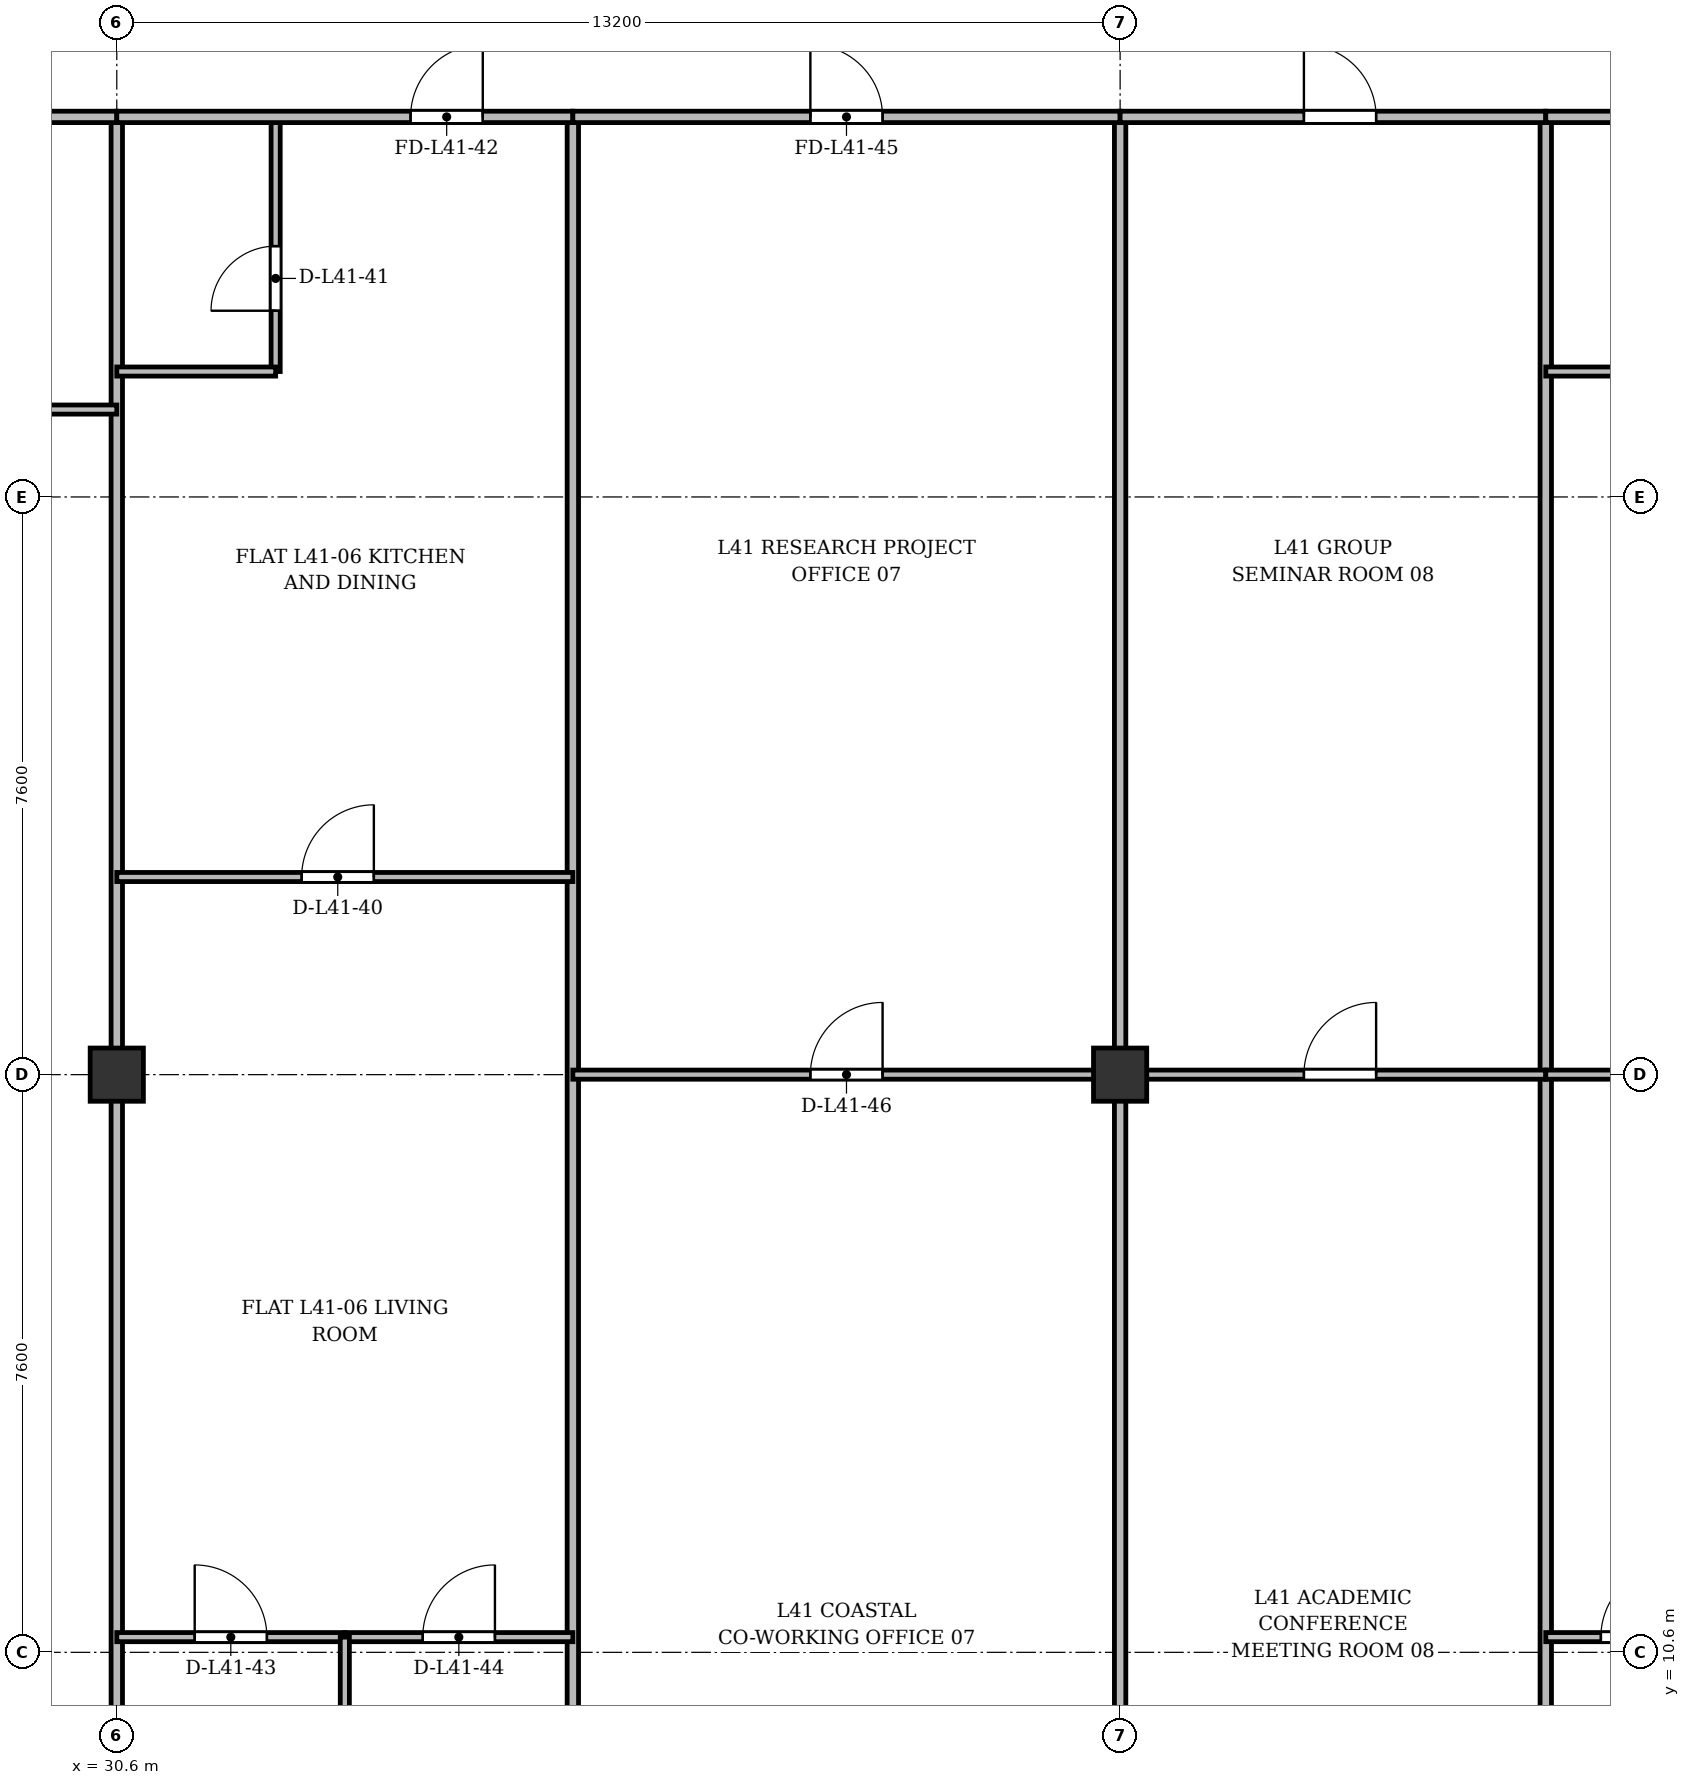
"""IFC4 building model, lengths in metres.
Left out: names, types, materials, properties, quantities, classifications, styles, units other than length and angle.
Written with IfcOpenShell. Run it as: python <this file> out.ifc"""

import sys

from ifc_helpers import new_model, si_unit, direction, frame, frame_2d, origin, origin_2d, place, context, subcontext, project, spatial, rectangle, extrude, source, transform, mapped, element, fill, save


model = new_model("IFC4")
c1 = context("Model", 3, precision=1e-05, world=origin(), true_north=direction((0.0, 1.0)))
c2 = subcontext(c1, "Body", "Model", "MODEL_VIEW")
j1 = project(units=[si_unit("LENGTHUNIT", "METRE"), si_unit("PLANEANGLEUNIT", "RADIAN")], contexts=[c1])
p1 = place(None, origin())
s1 = spatial("IfcSite", under=j1, at=p1, CompositionType="ELEMENT")
p2 = place(p1, origin())
s2 = spatial("IfcBuilding", under=s1, at=p2, CompositionType="ELEMENT")
p3 = place(p2, frame((0.0, 0.0, 157.3)))
s3 = spatial("IfcBuildingStorey", under=s2, at=p3, CompositionType="ELEMENT", Elevation=157.3)
m1 = source(origin(), c2, "Body", "SweptSolid", [
    extrude(rectangle(XDim=0.7, YDim=0.7, at=origin_2d()), origin(), (0.0, 0.0, 1.0), 3.6),
])
for number, where, z_axis, x_axis in (
    (1, (30.6, 18.2, 0.0), (0.0, 0.0, 1.0), (1.0, 0.0, 0.0)),
    (2, (43.8, 18.2, 0.0), (0.0, 0.0, 1.0), (1.0, 0.0, 0.0)),
):
    element("IfcColumn", number, at=place(p3, frame(where, z_axis=z_axis, x_axis=x_axis)), inside=s3, PredefinedType="COLUMN", context=c2, shape_type="MappedRepresentation", body=[
        mapped(m1, transform((0.0, 0.0, 0.0), x_axis=(1.0, 0.0, 0.0), y_axis=(0.0, 1.0, 0.0), z_axis=(0.0, 0.0, 1.0), scale=1.0)),
    ])
p4 = place(p3, frame((30.6, 3.525, 0.0), z_axis=(0.0, 0.0, 1.0), x_axis=(0.0, 1.0, 0.0)))
e3 = element("IfcWall", 3, at=p4, inside=s3, PredefinedType="PARTITIONING", context=c2, shape_type="SweptSolid", body=[
    extrude(rectangle(XDim=27.275, YDim=0.15, at=frame_2d((13.638, 0.0))), origin(), (0.0, 0.0, 1.0), 2.85),
])
p5 = place(p3, frame((36.6, 3.525, 0.0), z_axis=(0.0, 0.0, 1.0), x_axis=(0.0, 1.0, 0.0)))
e4 = element("IfcWall", 4, at=p5, inside=s3, PredefinedType="PARTITIONING", context=c2, shape_type="SweptSolid", body=[
    extrude(rectangle(XDim=27.275, YDim=0.15, at=frame_2d((13.638, 0.0))), origin(), (0.0, 0.0, 1.0), 2.75),
])
p6 = place(p3, frame((43.8, 3.525, 0.0), z_axis=(0.0, 0.0, 1.0), x_axis=(0.0, 1.0, 0.0)))
e5 = element("IfcWall", 5, at=p6, inside=s3, PredefinedType="PARTITIONING", context=c2, shape_type="SweptSolid", body=[
    extrude(rectangle(XDim=27.275, YDim=0.15, at=frame_2d((13.638, 0.0))), origin(), (0.0, 0.0, 1.0), 2.85),
])
p7 = place(p3, frame((49.4, 3.525, 0.0), z_axis=(0.0, 0.0, 1.0), x_axis=(0.0, 1.0, 0.0)))
e6 = element("IfcWall", 6, at=p7, inside=s3, PredefinedType="PARTITIONING", context=c2, shape_type="SweptSolid", body=[
    extrude(rectangle(XDim=27.275, YDim=0.15, at=frame_2d((13.638, 0.0))), origin(), (0.0, 0.0, 1.0), 2.75),
])
p8 = place(p3, frame((26.2, 30.8, 0.0), z_axis=(0.0, 0.0, 1.0), x_axis=(1.0, 0.0, 0.0)))
e7 = element("IfcWall", 7, at=p8, inside=s3, PredefinedType="PARTITIONING", context=c2, shape_type="SweptSolid", body=[
    extrude(rectangle(XDim=4.4, YDim=0.15, at=frame_2d((2.2, 0.0))), origin(), (0.0, 0.0, 1.0), 2.85),
])
p9 = place(p8, frame((1.725, 0.0, 0.0)))
e8 = element("IfcOpeningElement", 8, at=p9, cuts=e7, PredefinedType="OPENING", context=c2, shape_type="SweptSolid", body=[
    extrude(rectangle(XDim=0.95, YDim=2.15, at=frame_2d((0.475, 1.075))), frame((0.0, 0.085, 0.0), z_axis=(0.0, -1.0, 0.0), x_axis=(1.0, 0.0, 0.0)), (0.0, 0.0, 1.0), 0.17),
])
p10 = place(p3, frame((26.2, 26.95, 0.0), z_axis=(0.0, 0.0, 1.0), x_axis=(1.0, 0.0, 0.0)))
e9 = element("IfcWall", 9, at=p10, inside=s3, PredefinedType="PARTITIONING", context=c2, shape_type="SweptSolid", body=[
    extrude(rectangle(XDim=4.4, YDim=0.12, at=frame_2d((2.2, 0.0))), origin(), (0.0, 0.0, 1.0), 2.85),
])
p11 = place(p10, frame((1.725, 0.0, 0.0)))
e10 = element("IfcOpeningElement", 10, at=p11, cuts=e9, PredefinedType="OPENING", context=c2, shape_type="SweptSolid", body=[
    extrude(rectangle(XDim=0.95, YDim=2.15, at=frame_2d((0.475, 1.075))), frame((0.0, 0.07, 0.0), z_axis=(0.0, -1.0, 0.0), x_axis=(1.0, 0.0, 0.0)), (0.0, 0.0, 1.0), 0.14),
])
p12 = place(p3, frame((30.6, 20.8, 0.0), z_axis=(0.0, 0.0, 1.0), x_axis=(1.0, 0.0, 0.0)))
e11 = element("IfcWall", 11, at=p12, inside=s3, PredefinedType="PARTITIONING", context=c2, shape_type="SweptSolid", body=[
    extrude(rectangle(XDim=6.0, YDim=0.12, at=frame_2d((3.0, 0.0))), origin(), (0.0, 0.0, 1.0), 2.85),
])
p13 = place(p12, frame((2.432, 0.0, 0.0)))
e12 = element("IfcOpeningElement", 12, at=p13, cuts=e11, PredefinedType="OPENING", context=c2, shape_type="SweptSolid", body=[
    extrude(rectangle(XDim=0.95, YDim=2.15, at=frame_2d((0.475, 1.075))), frame((0.0, 0.07, 0.0), z_axis=(0.0, -1.0, 0.0), x_axis=(1.0, 0.0, 0.0)), (0.0, 0.0, 1.0), 0.14),
])
p14 = place(p3, frame((32.69, 27.45, 0.0), z_axis=(0.0, 0.0, 1.0), x_axis=(0.0, 1.0, 0.0)))
e13 = element("IfcWall", 13, at=p14, inside=s3, PredefinedType="PARTITIONING", context=c2, shape_type="SweptSolid", body=[
    extrude(rectangle(XDim=3.35, YDim=0.12, at=frame_2d((1.675, 0.0))), origin(), (0.0, 0.0, 1.0), 3.35),
])
p15 = place(p14, frame((0.8, 0.0, 0.0)))
e14 = element("IfcOpeningElement", 14, at=p15, cuts=e13, PredefinedType="OPENING", context=c2, shape_type="SweptSolid", body=[
    extrude(rectangle(XDim=0.85, YDim=2.1, at=frame_2d((0.425, 1.05))), frame((0.0, 0.07, 0.0), z_axis=(0.0, -1.0, 0.0), x_axis=(1.0, 0.0, 0.0)), (0.0, 0.0, 1.0), 0.14),
])
p16 = place(p3, frame((30.6, 27.45, 0.0), z_axis=(0.0, 0.0, 1.0), x_axis=(1.0, 0.0, 0.0)))
e15 = element("IfcWall", 15, at=p16, inside=s3, PredefinedType="PARTITIONING", context=c2, shape_type="SweptSolid", body=[
    extrude(rectangle(XDim=2.09, YDim=0.12, at=frame_2d((1.045, 0.0))), origin(), (0.0, 0.0, 1.0), 2.85),
])
p17 = place(p3, frame((30.6, 30.8, 0.0), z_axis=(0.0, 0.0, 1.0), x_axis=(1.0, 0.0, 0.0)))
e16 = element("IfcWall", 16, at=p17, inside=s3, PredefinedType="PARTITIONING", context=c2, shape_type="SweptSolid", body=[
    extrude(rectangle(XDim=6.0, YDim=0.15, at=frame_2d((3.0, 0.0))), origin(), (0.0, 0.0, 1.0), 2.85),
])
p18 = place(p17, frame((3.865, 0.0, 0.0)))
e17 = element("IfcOpeningElement", 17, at=p18, cuts=e16, PredefinedType="OPENING", context=c2, shape_type="SweptSolid", body=[
    extrude(rectangle(XDim=0.95, YDim=2.15, at=frame_2d((0.475, 1.075))), frame((0.0, 0.085, 0.0), z_axis=(0.0, -1.0, 0.0), x_axis=(1.0, 0.0, 0.0)), (0.0, 0.0, 1.0), 0.17),
])
p19 = place(p3, frame((30.6, 10.8, 0.0), z_axis=(0.0, 0.0, 1.0), x_axis=(1.0, 0.0, 0.0)))
e18 = element("IfcWall", 18, at=p19, inside=s3, PredefinedType="PARTITIONING", context=c2, shape_type="SweptSolid", body=[
    extrude(rectangle(XDim=3.0, YDim=0.12, at=frame_2d((1.5, 0.0))), origin(), (0.0, 0.0, 1.0), 2.85),
])
p20 = place(p19, frame((1.025, 0.0, 0.0)))
e19 = element("IfcOpeningElement", 19, at=p20, cuts=e18, PredefinedType="OPENING", context=c2, shape_type="SweptSolid", body=[
    extrude(rectangle(XDim=0.95, YDim=2.15, at=frame_2d((0.475, 1.075))), frame((0.0, 0.07, 0.0), z_axis=(0.0, -1.0, 0.0), x_axis=(1.0, 0.0, 0.0)), (0.0, 0.0, 1.0), 0.14),
])
p21 = place(p3, frame((33.6, 10.8, 0.0), z_axis=(0.0, 0.0, 1.0), x_axis=(1.0, 0.0, 0.0)))
e20 = element("IfcWall", 20, at=p21, inside=s3, PredefinedType="PARTITIONING", context=c2, shape_type="SweptSolid", body=[
    extrude(rectangle(XDim=3.0, YDim=0.12, at=frame_2d((1.5, 0.0))), origin(), (0.0, 0.0, 1.0), 3.35),
])
p22 = place(p21, frame((1.025, 0.0, 0.0)))
e21 = element("IfcOpeningElement", 21, at=p22, cuts=e20, PredefinedType="OPENING", context=c2, shape_type="SweptSolid", body=[
    extrude(rectangle(XDim=0.95, YDim=2.15, at=frame_2d((0.475, 1.075))), frame((0.0, 0.07, 0.0), z_axis=(0.0, -1.0, 0.0), x_axis=(1.0, 0.0, 0.0)), (0.0, 0.0, 1.0), 0.14),
])
p23 = place(p3, frame((33.6, 3.525, 0.0), z_axis=(0.0, 0.0, 1.0), x_axis=(0.0, 1.0, 0.0)))
e22 = element("IfcWall", 22, at=p23, inside=s3, PredefinedType="PARTITIONING", context=c2, shape_type="SweptSolid", body=[
    extrude(rectangle(XDim=7.275, YDim=0.12, at=frame_2d((3.638, 0.0))), origin(), (0.0, 0.0, 1.0), 2.75),
])
p24 = place(p3, frame((36.6, 30.8, 0.0), z_axis=(0.0, 0.0, 1.0), x_axis=(1.0, 0.0, 0.0)))
e23 = element("IfcWall", 23, at=p24, inside=s3, PredefinedType="PARTITIONING", context=c2, shape_type="SweptSolid", body=[
    extrude(rectangle(XDim=7.2, YDim=0.15, at=frame_2d((3.6, 0.0))), origin(), (0.0, 0.0, 1.0), 2.85),
])
p25 = place(p24, frame((3.125, 0.0, 0.0)))
e24 = element("IfcOpeningElement", 24, at=p25, cuts=e23, PredefinedType="OPENING", context=c2, shape_type="SweptSolid", body=[
    extrude(rectangle(XDim=0.95, YDim=2.15, at=frame_2d((0.475, 1.075))), frame((0.0, 0.085, 0.0), z_axis=(0.0, -1.0, 0.0), x_axis=(1.0, 0.0, 0.0)), (0.0, 0.0, 1.0), 0.17),
])
p26 = place(p3, frame((36.6, 18.2, 0.0), z_axis=(0.0, 0.0, 1.0), x_axis=(1.0, 0.0, 0.0)))
e25 = element("IfcWall", 25, at=p26, inside=s3, PredefinedType="PARTITIONING", context=c2, shape_type="SweptSolid", body=[
    extrude(rectangle(XDim=7.2, YDim=0.12, at=frame_2d((3.6, 0.0))), origin(), (0.0, 0.0, 1.0), 2.75),
])
p27 = place(p26, frame((3.125, 0.0, 0.0)))
e26 = element("IfcOpeningElement", 26, at=p27, cuts=e25, PredefinedType="OPENING", context=c2, shape_type="SweptSolid", body=[
    extrude(rectangle(XDim=0.95, YDim=2.15, at=frame_2d((0.475, 1.075))), frame((0.0, 0.07, 0.0), z_axis=(0.0, -1.0, 0.0), x_axis=(1.0, 0.0, 0.0)), (0.0, 0.0, 1.0), 0.14),
])
p28 = place(p3, frame((43.8, 30.8, 0.0), z_axis=(0.0, 0.0, 1.0), x_axis=(1.0, 0.0, 0.0)))
e27 = element("IfcWall", 27, at=p28, inside=s3, PredefinedType="PARTITIONING", context=c2, shape_type="SweptSolid", body=[
    extrude(rectangle(XDim=5.6, YDim=0.15, at=frame_2d((2.8, 0.0))), origin(), (0.0, 0.0, 1.0), 2.85),
])
p29 = place(p28, frame((2.418, 0.0, 0.0)))
e28 = element("IfcOpeningElement", 28, at=p29, cuts=e27, PredefinedType="OPENING", context=c2, shape_type="SweptSolid", body=[
    extrude(rectangle(XDim=0.95, YDim=2.15, at=frame_2d((0.475, 1.075))), frame((0.0, 0.085, 0.0), z_axis=(0.0, -1.0, 0.0), x_axis=(1.0, 0.0, 0.0)), (0.0, 0.0, 1.0), 0.17),
])
p30 = place(p3, frame((43.8, 18.2, 0.0), z_axis=(0.0, 0.0, 1.0), x_axis=(1.0, 0.0, 0.0)))
e29 = element("IfcWall", 29, at=p30, inside=s3, PredefinedType="PARTITIONING", context=c2, shape_type="SweptSolid", body=[
    extrude(rectangle(XDim=5.6, YDim=0.12, at=frame_2d((2.8, 0.0))), origin(), (0.0, 0.0, 1.0), 2.75),
])
p31 = place(p30, frame((2.418, 0.0, 0.0)))
e30 = element("IfcOpeningElement", 30, at=p31, cuts=e29, PredefinedType="OPENING", context=c2, shape_type="SweptSolid", body=[
    extrude(rectangle(XDim=0.95, YDim=2.15, at=frame_2d((0.475, 1.075))), frame((0.0, 0.07, 0.0), z_axis=(0.0, -1.0, 0.0), x_axis=(1.0, 0.0, 0.0)), (0.0, 0.0, 1.0), 0.14),
])
p32 = place(p3, frame((49.4, 18.2, 0.0), z_axis=(0.0, 0.0, 1.0), x_axis=(1.0, 0.0, 0.0)))
e31 = element("IfcWall", 31, at=p32, inside=s3, PredefinedType="PARTITIONING", context=c2, shape_type="SweptSolid", body=[
    extrude(rectangle(XDim=4.8, YDim=0.12, at=frame_2d((2.4, 0.0))), origin(), (0.0, 0.0, 1.0), 2.75),
])
p33 = place(p32, frame((2.561, 0.0, 0.0)))
e32 = element("IfcOpeningElement", 32, at=p33, cuts=e31, PredefinedType="OPENING", context=c2, shape_type="SweptSolid", body=[
    extrude(rectangle(XDim=0.95, YDim=2.15, at=frame_2d((0.475, 1.075))), frame((0.0, 0.07, 0.0), z_axis=(0.0, -1.0, 0.0), x_axis=(1.0, 0.0, 0.0)), (0.0, 0.0, 1.0), 0.14),
])
p34 = place(p3, frame((49.4, 27.45, 0.0), z_axis=(0.0, 0.0, 1.0), x_axis=(1.0, 0.0, 0.0)))
e33 = element("IfcWall", 33, at=p34, inside=s3, PredefinedType="PARTITIONING", context=c2, shape_type="SweptSolid", body=[
    extrude(rectangle(XDim=1.9, YDim=0.12, at=frame_2d((0.95, 0.0))), origin(), (0.0, 0.0, 1.0), 2.85),
])
p35 = place(p3, frame((49.4, 30.8, 0.0), z_axis=(0.0, 0.0, 1.0), x_axis=(1.0, 0.0, 0.0)))
e34 = element("IfcWall", 34, at=p35, inside=s3, PredefinedType="PARTITIONING", context=c2, shape_type="SweptSolid", body=[
    extrude(rectangle(XDim=4.8, YDim=0.15, at=frame_2d((2.4, 0.0))), origin(), (0.0, 0.0, 1.0), 2.85),
])
p36 = place(p35, frame((3.019, 0.0, 0.0)))
e35 = element("IfcOpeningElement", 35, at=p36, cuts=e34, PredefinedType="OPENING", context=c2, shape_type="SweptSolid", body=[
    extrude(rectangle(XDim=0.95, YDim=2.15, at=frame_2d((0.475, 1.075))), frame((0.0, 0.085, 0.0), z_axis=(0.0, -1.0, 0.0), x_axis=(1.0, 0.0, 0.0)), (0.0, 0.0, 1.0), 0.17),
])
p37 = place(p3, frame((49.4, 10.8, 0.0), z_axis=(0.0, 0.0, 1.0), x_axis=(1.0, 0.0, 0.0)))
e36 = element("IfcWall", 36, at=p37, inside=s3, PredefinedType="PARTITIONING", context=c2, shape_type="SweptSolid", body=[
    extrude(rectangle(XDim=2.4, YDim=0.12, at=frame_2d((1.2, 0.0))), origin(), (0.0, 0.0, 1.0), 2.85),
])
p38 = place(p37, frame((0.725, 0.0, 0.0)))
e37 = element("IfcOpeningElement", 37, at=p38, cuts=e36, PredefinedType="OPENING", context=c2, shape_type="SweptSolid", body=[
    extrude(rectangle(XDim=0.95, YDim=2.15, at=frame_2d((0.475, 1.075))), frame((0.0, 0.07, 0.0), z_axis=(0.0, -1.0, 0.0), x_axis=(1.0, 0.0, 0.0)), (0.0, 0.0, 1.0), 0.14),
])
m2 = source(origin(), c2, "Body", "SweptSolid", [
    extrude(rectangle(XDim=0.95, YDim=2.15, at=frame_2d((0.475, 1.075))), frame((0.0, 0.025, 0.0), z_axis=(0.0, -1.0, 0.0), x_axis=(1.0, 0.0, 0.0)), (0.0, 0.0, 1.0), 0.05),
])
p39 = place(p13, origin())
e38 = element("IfcDoor", 38, at=p39, inside=s3, OperationType="SINGLE_SWING_RIGHT", PredefinedType="DOOR", context=c2, shape_type="MappedRepresentation", body=[
    mapped(m2, transform((0.0, 0.0, 0.0), x_axis=(1.0, 0.0, 0.0), y_axis=(0.0, 1.0, 0.0), z_axis=(0.0, 0.0, 1.0), scale=1.0)),
])
fill(e12, e38)
m3 = source(origin(), c2, "Body", "SweptSolid", [
    extrude(rectangle(XDim=0.85, YDim=2.1, at=frame_2d((0.425, 1.05))), frame((0.0, 0.025, 0.0), z_axis=(0.0, -1.0, 0.0), x_axis=(1.0, 0.0, 0.0)), (0.0, 0.0, 1.0), 0.05),
])
p40 = place(p15, origin())
e39 = element("IfcDoor", 39, at=p40, inside=s3, OperationType="SINGLE_SWING_LEFT", PredefinedType="DOOR", context=c2, shape_type="MappedRepresentation", body=[
    mapped(m3, transform((0.0, 0.0, 0.0), x_axis=(1.0, 0.0, 0.0), y_axis=(0.0, 1.0, 0.0), z_axis=(0.0, 0.0, 1.0), scale=1.0)),
])
fill(e14, e39)
p41 = place(p18, origin())
e40 = element("IfcDoor", 40, at=p41, inside=s3, OperationType="SINGLE_SWING_RIGHT", PredefinedType="DOOR", context=c2, shape_type="MappedRepresentation", body=[
    mapped(m2, transform((0.0, 0.0, 0.0), x_axis=(1.0, 0.0, 0.0), y_axis=(0.0, 1.0, 0.0), z_axis=(0.0, 0.0, 1.0), scale=1.0)),
])
fill(e17, e40)
p42 = place(p20, origin())
e41 = element("IfcDoor", 41, at=p42, inside=s3, OperationType="SINGLE_SWING_LEFT", PredefinedType="DOOR", context=c2, shape_type="MappedRepresentation", body=[
    mapped(m2, transform((0.0, 0.0, 0.0), x_axis=(1.0, 0.0, 0.0), y_axis=(0.0, 1.0, 0.0), z_axis=(0.0, 0.0, 1.0), scale=1.0)),
])
fill(e19, e41)
p43 = place(p22, origin())
e42 = element("IfcDoor", 42, at=p43, inside=s3, OperationType="SINGLE_SWING_RIGHT", PredefinedType="DOOR", context=c2, shape_type="MappedRepresentation", body=[
    mapped(m2, transform((0.0, 0.0, 0.0), x_axis=(1.0, 0.0, 0.0), y_axis=(0.0, 1.0, 0.0), z_axis=(0.0, 0.0, 1.0), scale=1.0)),
])
fill(e21, e42)
p44 = place(p25, origin())
e43 = element("IfcDoor", 43, at=p44, inside=s3, OperationType="SINGLE_SWING_LEFT", PredefinedType="DOOR", context=c2, shape_type="MappedRepresentation", body=[
    mapped(m2, transform((0.0, 0.0, 0.0), x_axis=(1.0, 0.0, 0.0), y_axis=(0.0, 1.0, 0.0), z_axis=(0.0, 0.0, 1.0), scale=1.0)),
])
fill(e24, e43)
p45 = place(p27, origin())
e44 = element("IfcDoor", 44, at=p45, inside=s3, OperationType="SINGLE_SWING_RIGHT", PredefinedType="DOOR", context=c2, shape_type="MappedRepresentation", body=[
    mapped(m2, transform((0.0, 0.0, 0.0), x_axis=(1.0, 0.0, 0.0), y_axis=(0.0, 1.0, 0.0), z_axis=(0.0, 0.0, 1.0), scale=1.0)),
])
fill(e26, e44)
p46 = place(p29, origin())
e45 = element("IfcDoor", 45, at=p46, inside=s3, OperationType="SINGLE_SWING_LEFT", PredefinedType="DOOR", context=c2, shape_type="MappedRepresentation", body=[
    mapped(m2, transform((0.0, 0.0, 0.0), x_axis=(1.0, 0.0, 0.0), y_axis=(0.0, 1.0, 0.0), z_axis=(0.0, 0.0, 1.0), scale=1.0)),
])
fill(e28, e45)
p47 = place(p31, origin())
e46 = element("IfcDoor", 46, at=p47, inside=s3, OperationType="SINGLE_SWING_RIGHT", PredefinedType="DOOR", context=c2, shape_type="MappedRepresentation", body=[
    mapped(m2, transform((0.0, 0.0, 0.0), x_axis=(1.0, 0.0, 0.0), y_axis=(0.0, 1.0, 0.0), z_axis=(0.0, 0.0, 1.0), scale=1.0)),
])
fill(e30, e46)
p48 = place(p38, origin())
e47 = element("IfcDoor", 47, at=p48, inside=s3, OperationType="SINGLE_SWING_RIGHT", PredefinedType="DOOR", context=c2, shape_type="MappedRepresentation", body=[
    mapped(m2, transform((0.0, 0.0, 0.0), x_axis=(1.0, 0.0, 0.0), y_axis=(0.0, 1.0, 0.0), z_axis=(0.0, 0.0, 1.0), scale=1.0)),
])
fill(e37, e47)
save(model, sys.argv[1])
